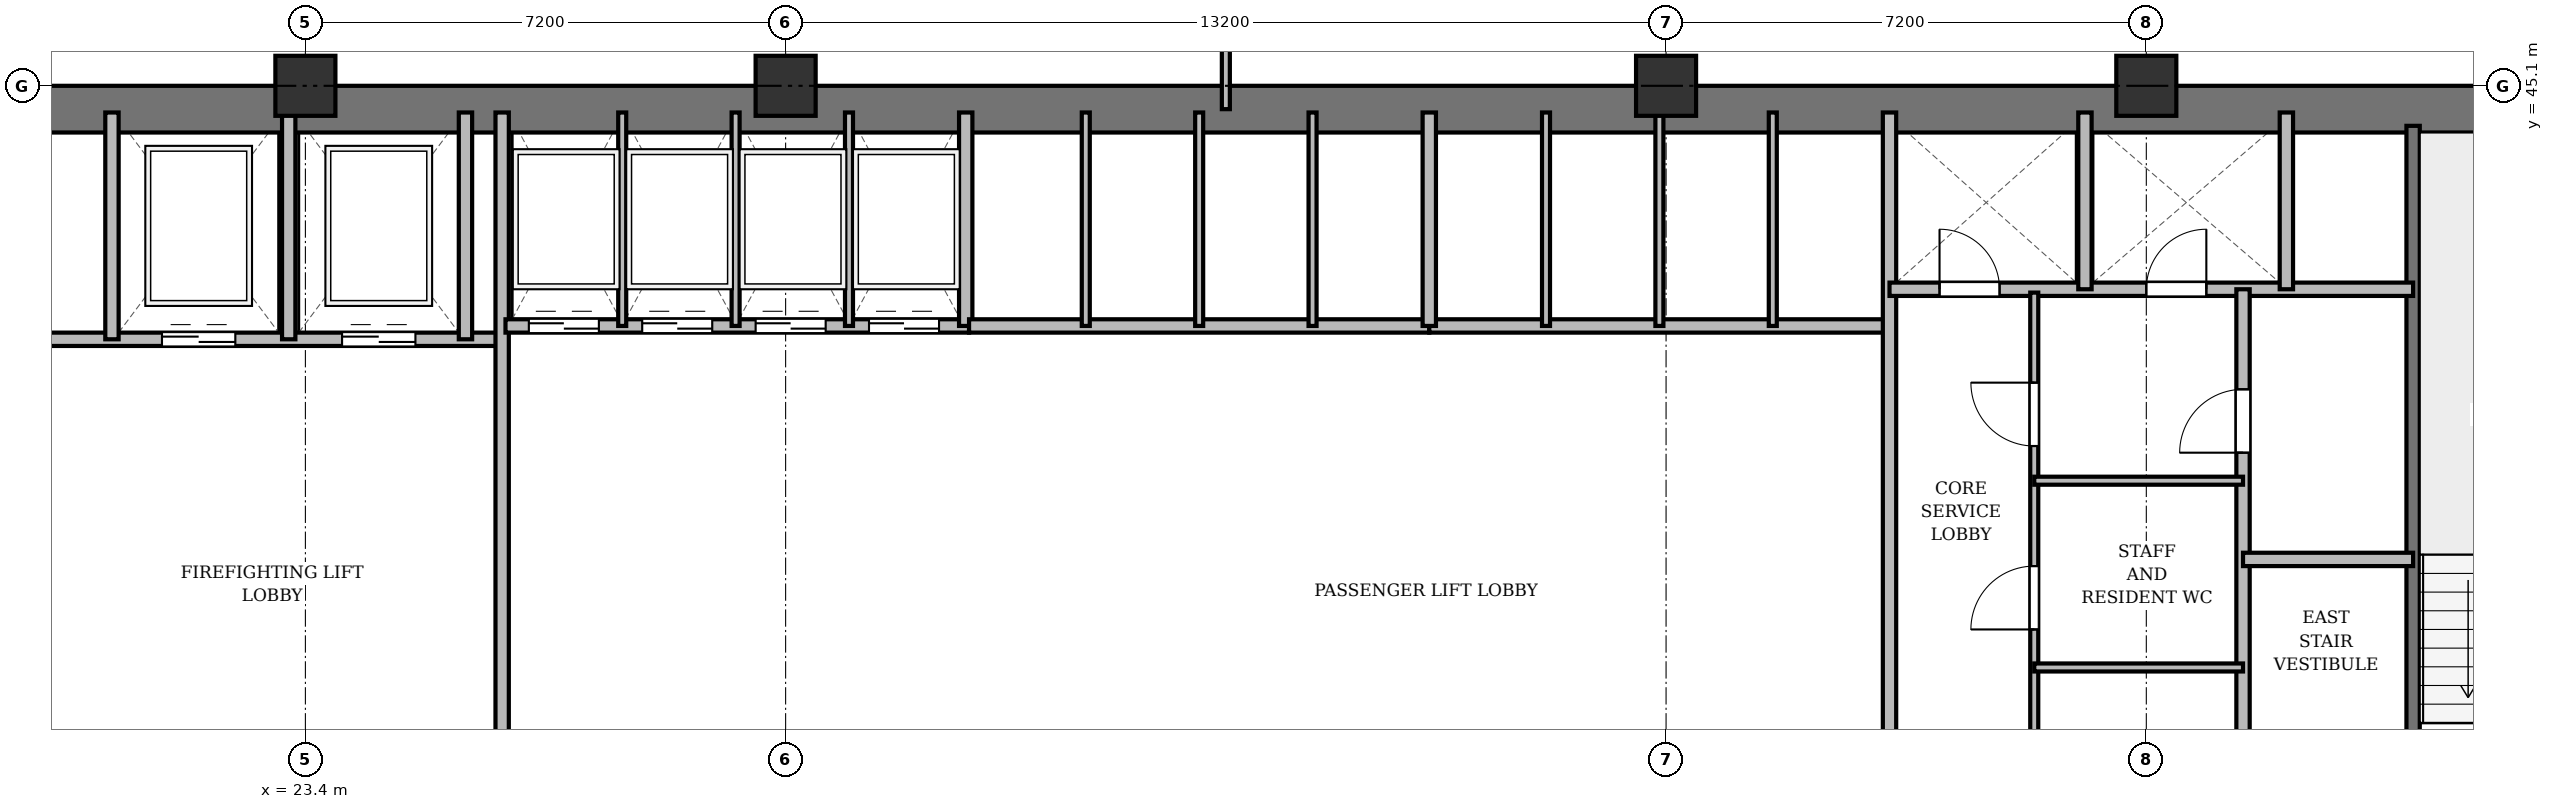
"""IFC4 building model, lengths in metres.
Left out: names, types, materials, properties, quantities, classifications, styles, units other than length and angle.
Written with IfcOpenShell. Run it as: python <this file> out.ifc"""

import sys

from ifc_helpers import new_model, si_unit, direction, frame, frame_2d, origin, origin_2d, place, context, subcontext, project, spatial, rectangle, extrude, source, transform, mapped, element, fill, save


model = new_model("IFC4")
c1 = context("Model", 3, precision=1e-05, world=origin(), true_north=direction((0.0, 1.0)))
c2 = subcontext(c1, "Body", "Model", "MODEL_VIEW")
j1 = project(units=[si_unit("LENGTHUNIT", "METRE"), si_unit("PLANEANGLEUNIT", "RADIAN")], contexts=[c1])
p1 = place(None, origin())
s1 = spatial("IfcSite", under=j1, at=p1, CompositionType="ELEMENT")
p2 = place(p1, origin())
s2 = spatial("IfcBuilding", under=s1, at=p2, CompositionType="ELEMENT")
p3 = place(p2, frame((0.0, 0.0, 34.3)))
s3 = spatial("IfcBuildingStorey", under=s2, at=p3, CompositionType="ELEMENT", Elevation=34.3)
m1 = source(origin(), c2, "Body", "SweptSolid", [
    extrude(rectangle(XDim=0.9, YDim=0.9, at=origin_2d()), origin(), (0.0, 0.0, 1.0), 3.6),
])
for number, where, z_axis, x_axis in (
    (1, (23.4, 45.1, 0.0), (0.0, 0.0, 1.0), (1.0, 0.0, 0.0)),
    (2, (30.6, 45.1, 0.0), (0.0, 0.0, 1.0), (1.0, 0.0, 0.0)),
    (3, (43.8, 45.1, 0.0), (0.0, 0.0, 1.0), (1.0, 0.0, 0.0)),
    (4, (51.0, 45.1, 0.0), (0.0, 0.0, 1.0), (1.0, 0.0, 0.0)),
):
    element("IfcColumn", number, at=place(p3, frame(where, z_axis=z_axis, x_axis=x_axis)), inside=s3, PredefinedType="COLUMN", context=c2, shape_type="MappedRepresentation", body=[
        mapped(m1, transform((0.0, 0.0, 0.0), x_axis=(1.0, 0.0, 0.0), y_axis=(0.0, 1.0, 0.0), z_axis=(0.0, 0.0, 1.0), scale=1.0)),
    ])
p4 = place(p3, frame((15.5, 44.75, 0.0), z_axis=(0.0, 0.0, 1.0), x_axis=(1.0, 0.0, 0.0)))
e5 = element("IfcWall", 5, at=p4, inside=s3, PredefinedType="SHEAR", context=c2, shape_type="SweptSolid", body=[
    extrude(rectangle(XDim=43.4, YDim=0.7, at=frame_2d((21.7, 0.0))), origin(), (0.0, 0.0, 1.0), 3.34),
])
p5 = place(p3, frame((55.0, 33.4, 0.0), z_axis=(0.0, 0.0, 1.0), x_axis=(0.0, 1.0, 0.0)))
e6 = element("IfcWall", 6, at=p5, inside=s3, PredefinedType="SHEAR", context=c2, shape_type="SweptSolid", body=[
    extrude(rectangle(XDim=11.1, YDim=0.2, at=frame_2d((5.55, 0.0))), origin(), (0.0, 0.0, 1.0), 3.34),
])
p6 = place(p5, frame((0.85, 0.0, 0.0)))
e7 = element("IfcOpeningElement", 7, at=p6, cuts=e6, PredefinedType="OPENING", context=c2, shape_type="SweptSolid", body=[
    extrude(rectangle(XDim=1.1, YDim=2.15, at=frame_2d((0.55, 1.075))), frame((0.0, 0.11, 0.0), z_axis=(0.0, -1.0, 0.0), x_axis=(1.0, 0.0, 0.0)), (0.0, 0.0, 1.0), 0.22),
])
p7 = place(p3, frame((19.55, 41.3, 0.0), z_axis=(0.0, 0.0, 1.0), x_axis=(1.0, 0.0, 0.0)))
e8 = element("IfcWall", 8, at=p7, inside=s3, PredefinedType="SOLIDWALL", context=c2, shape_type="SweptSolid", body=[
    extrude(rectangle(XDim=6.75, YDim=0.2, at=frame_2d((3.375, 0.0))), origin(), (0.0, 0.0, 1.0), 3.34),
])
p8 = place(p7, frame((1.7, 0.0, 0.0)))
e9 = element("IfcOpeningElement", 9, at=p8, cuts=e8, PredefinedType="OPENING", context=c2, shape_type="SweptSolid", body=[
    extrude(rectangle(XDim=1.1, YDim=2.15, at=frame_2d((0.55, 1.075))), frame((0.0, 0.11, 0.0), z_axis=(0.0, -1.0, 0.0), x_axis=(1.0, 0.0, 0.0)), (0.0, 0.0, 1.0), 0.22),
])
p9 = place(p7, frame((4.4, 0.0, 0.0)))
e10 = element("IfcOpeningElement", 10, at=p9, cuts=e8, PredefinedType="OPENING", context=c2, shape_type="SweptSolid", body=[
    extrude(rectangle(XDim=1.1, YDim=2.15, at=frame_2d((0.55, 1.075))), frame((0.0, 0.11, 0.0), z_axis=(0.0, -1.0, 0.0), x_axis=(1.0, 0.0, 0.0)), (0.0, 0.0, 1.0), 0.22),
])
for number, where, z_axis, x_axis in (
    (11, (20.5, 41.3, 0.0), (0.0, 0.0, 1.0), (0.0, 1.0, 0.0)),
    (12, (23.15, 41.3, 0.0), (0.0, 0.0, 1.0), (0.0, 1.0, 0.0)),
    (13, (25.8, 41.3, 0.0), (0.0, 0.0, 1.0), (0.0, 1.0, 0.0)),
):
    element("IfcWall", number, at=place(p3, frame(where, z_axis=z_axis, x_axis=x_axis)), inside=s3, PredefinedType="SOLIDWALL", context=c2, shape_type="SweptSolid", body=[
        extrude(rectangle(XDim=3.4, YDim=0.2, at=frame_2d((1.7, 0.0))), origin(), (0.0, 0.0, 1.0), 3.34),
    ])
p10 = place(p3, frame((26.35, 33.4, 0.0), z_axis=(0.0, 0.0, 1.0), x_axis=(0.0, 1.0, 0.0)))
e14 = element("IfcWall", 14, at=p10, inside=s3, PredefinedType="SOLIDWALL", context=c2, shape_type="SweptSolid", body=[
    extrude(rectangle(XDim=11.3, YDim=0.2, at=frame_2d((5.65, 0.0))), origin(), (0.0, 0.0, 1.0), 2.69),
])
p11 = place(p3, frame((26.4, 41.5, 0.0), z_axis=(0.0, 0.0, 1.0), x_axis=(1.0, 0.0, 0.0)))
e15 = element("IfcWall", 15, at=p11, inside=s3, PredefinedType="SOLIDWALL", context=c2, shape_type="SweptSolid", body=[
    extrude(rectangle(XDim=6.95, YDim=0.2, at=frame_2d((3.475, 0.0))), origin(), (0.0, 0.0, 1.0), 3.34),
])
p12 = place(p11, frame((0.35, 0.0, 0.0)))
e16 = element("IfcOpeningElement", 16, at=p12, cuts=e15, PredefinedType="OPENING", context=c2, shape_type="SweptSolid", body=[
    extrude(rectangle(XDim=1.05, YDim=2.15, at=frame_2d((0.525, 1.075))), frame((0.0, 0.11, 0.0), z_axis=(0.0, -1.0, 0.0), x_axis=(1.0, 0.0, 0.0)), (0.0, 0.0, 1.0), 0.22),
])
p13 = place(p11, frame((2.05, 0.0, 0.0)))
e17 = element("IfcOpeningElement", 17, at=p13, cuts=e15, PredefinedType="OPENING", context=c2, shape_type="SweptSolid", body=[
    extrude(rectangle(XDim=1.05, YDim=2.15, at=frame_2d((0.525, 1.075))), frame((0.0, 0.11, 0.0), z_axis=(0.0, -1.0, 0.0), x_axis=(1.0, 0.0, 0.0)), (0.0, 0.0, 1.0), 0.22),
])
p14 = place(p11, frame((3.75, 0.0, 0.0)))
e18 = element("IfcOpeningElement", 18, at=p14, cuts=e15, PredefinedType="OPENING", context=c2, shape_type="SweptSolid", body=[
    extrude(rectangle(XDim=1.05, YDim=2.15, at=frame_2d((0.525, 1.075))), frame((0.0, 0.11, 0.0), z_axis=(0.0, -1.0, 0.0), x_axis=(1.0, 0.0, 0.0)), (0.0, 0.0, 1.0), 0.22),
])
p15 = place(p11, frame((5.45, 0.0, 0.0)))
e19 = element("IfcOpeningElement", 19, at=p15, cuts=e15, PredefinedType="OPENING", context=c2, shape_type="SweptSolid", body=[
    extrude(rectangle(XDim=1.05, YDim=2.15, at=frame_2d((0.525, 1.075))), frame((0.0, 0.11, 0.0), z_axis=(0.0, -1.0, 0.0), x_axis=(1.0, 0.0, 0.0)), (0.0, 0.0, 1.0), 0.22),
])
p16 = place(p3, frame((33.3, 41.5, 0.0), z_axis=(0.0, 0.0, 1.0), x_axis=(0.0, 1.0, 0.0)))
e20 = element("IfcWall", 20, at=p16, inside=s3, PredefinedType="SOLIDWALL", context=c2, shape_type="SweptSolid", body=[
    extrude(rectangle(XDim=3.2, YDim=0.2, at=frame_2d((1.6, 0.0))), origin(), (0.0, 0.0, 1.0), 3.34),
])
for number, where, z_axis, x_axis in (
    (21, (28.15, 41.5, 0.0), (0.0, 0.0, 1.0), (0.0, 1.0, 0.0)),
    (22, (29.85, 41.5, 0.0), (0.0, 0.0, 1.0), (0.0, 1.0, 0.0)),
    (23, (31.55, 41.5, 0.0), (0.0, 0.0, 1.0), (0.0, 1.0, 0.0)),
):
    element("IfcWall", number, at=place(p3, frame(where, z_axis=z_axis, x_axis=x_axis)), inside=s3, PredefinedType="PARTITIONING", context=c2, shape_type="SweptSolid", body=[
        extrude(rectangle(XDim=3.2, YDim=0.12, at=frame_2d((1.6, 0.0))), origin(), (0.0, 0.0, 1.0), 3.34),
    ])
p17 = place(p3, frame((33.35, 41.5, 0.0), z_axis=(0.0, 0.0, 1.0), x_axis=(1.0, 0.0, 0.0)))
e24 = element("IfcWall", 24, at=p17, inside=s3, PredefinedType="SOLIDWALL", context=c2, shape_type="SweptSolid", body=[
    extrude(rectangle(XDim=6.9, YDim=0.2, at=frame_2d((3.45, 0.0))), origin(), (0.0, 0.0, 1.0), 3.34),
])
for number, where, z_axis, x_axis in (
    (25, (35.1, 41.5, 0.0), (0.0, 0.0, 1.0), (0.0, 1.0, 0.0)),
    (26, (36.8, 41.5, 0.0), (0.0, 0.0, 1.0), (0.0, 1.0, 0.0)),
    (27, (38.5, 41.5, 0.0), (0.0, 0.0, 1.0), (0.0, 1.0, 0.0)),
):
    element("IfcWall", number, at=place(p3, frame(where, z_axis=z_axis, x_axis=x_axis)), inside=s3, PredefinedType="PARTITIONING", context=c2, shape_type="SweptSolid", body=[
        extrude(rectangle(XDim=3.2, YDim=0.12, at=frame_2d((1.6, 0.0))), origin(), (0.0, 0.0, 1.0), 3.34),
    ])
p18 = place(p3, frame((40.25, 41.5, 0.0), z_axis=(0.0, 0.0, 1.0), x_axis=(1.0, 0.0, 0.0)))
e28 = element("IfcWall", 28, at=p18, inside=s3, PredefinedType="SOLIDWALL", context=c2, shape_type="SweptSolid", body=[
    extrude(rectangle(XDim=6.9, YDim=0.2, at=frame_2d((3.45, 0.0))), origin(), (0.0, 0.0, 1.0), 2.752),
])
p19 = place(p3, frame((40.25, 41.5, 0.0), z_axis=(0.0, 0.0, 1.0), x_axis=(0.0, 1.0, 0.0)))
e29 = element("IfcWall", 29, at=p19, inside=s3, PredefinedType="SOLIDWALL", context=c2, shape_type="SweptSolid", body=[
    extrude(rectangle(XDim=3.2, YDim=0.2, at=frame_2d((1.6, 0.0))), origin(), (0.0, 0.0, 1.0), 3.34),
])
p20 = place(p3, frame((42.0, 41.5, 0.0), z_axis=(0.0, 0.0, 1.0), x_axis=(0.0, 1.0, 0.0)))
e30 = element("IfcWall", 30, at=p20, inside=s3, PredefinedType="PARTITIONING", context=c2, shape_type="SweptSolid", body=[
    extrude(rectangle(XDim=3.2, YDim=0.12, at=frame_2d((1.6, 0.0))), origin(), (0.0, 0.0, 1.0), 3.34),
])
p21 = place(p3, frame((43.7, 41.5, 0.0), z_axis=(0.0, 0.0, 1.0), x_axis=(0.0, 1.0, 0.0)))
e31 = element("IfcWall", 31, at=p21, inside=s3, PredefinedType="PARTITIONING", context=c2, shape_type="SweptSolid", body=[
    extrude(rectangle(XDim=3.2, YDim=0.12, at=frame_2d((1.6, 0.0))), origin(), (0.0, 0.0, 1.0), 2.752),
])
p22 = place(p3, frame((45.4, 41.5, 0.0), z_axis=(0.0, 0.0, 1.0), x_axis=(0.0, 1.0, 0.0)))
e32 = element("IfcWall", 32, at=p22, inside=s3, PredefinedType="PARTITIONING", context=c2, shape_type="SweptSolid", body=[
    extrude(rectangle(XDim=3.2, YDim=0.12, at=frame_2d((1.6, 0.0))), origin(), (0.0, 0.0, 1.0), 3.34),
])
p23 = place(p3, frame((47.15, 33.4, 0.0), z_axis=(0.0, 0.0, 1.0), x_axis=(0.0, 1.0, 0.0)))
e33 = element("IfcWall", 33, at=p23, inside=s3, PredefinedType="SOLIDWALL", context=c2, shape_type="SweptSolid", body=[
    extrude(rectangle(XDim=11.3, YDim=0.2, at=frame_2d((5.65, 0.0))), origin(), (0.0, 0.0, 1.0), 2.69),
])
p24 = place(p3, frame((47.15, 42.05, 0.0), z_axis=(0.0, 0.0, 1.0), x_axis=(1.0, 0.0, 0.0)))
e34 = element("IfcWall", 34, at=p24, inside=s3, PredefinedType="SOLIDWALL", context=c2, shape_type="SweptSolid", body=[
    extrude(rectangle(XDim=7.85, YDim=0.2, at=frame_2d((3.925, 0.0))), origin(), (0.0, 0.0, 1.0), 2.752),
])
p25 = place(p24, frame((0.75, 0.0, 0.0)))
e35 = element("IfcOpeningElement", 35, at=p25, cuts=e34, PredefinedType="OPENING", context=c2, shape_type="SweptSolid", body=[
    extrude(rectangle(XDim=0.9, YDim=2.1, at=frame_2d((0.45, 1.05))), frame((0.0, 0.11, 0.0), z_axis=(0.0, -1.0, 0.0), x_axis=(1.0, 0.0, 0.0)), (0.0, 0.0, 1.0), 0.22),
])
p26 = place(p24, frame((3.85, 0.0, 0.0)))
e36 = element("IfcOpeningElement", 36, at=p26, cuts=e34, PredefinedType="OPENING", context=c2, shape_type="SweptSolid", body=[
    extrude(rectangle(XDim=0.9, YDim=2.1, at=frame_2d((0.45, 1.05))), frame((0.0, 0.11, 0.0), z_axis=(0.0, -1.0, 0.0), x_axis=(1.0, 0.0, 0.0)), (0.0, 0.0, 1.0), 0.22),
])
for number, where, z_axis, x_axis in (
    (37, (50.08, 42.05, 0.0), (0.0, 0.0, 1.0), (0.0, 1.0, 0.0)),
    (38, (53.1, 42.05, 0.0), (0.0, 0.0, 1.0), (0.0, 1.0, 0.0)),
):
    element("IfcWall", number, at=place(p3, frame(where, z_axis=z_axis, x_axis=x_axis)), inside=s3, PredefinedType="SOLIDWALL", context=c2, shape_type="SweptSolid", body=[
        extrude(rectangle(XDim=2.65, YDim=0.2, at=frame_2d((1.325, 0.0))), origin(), (0.0, 0.0, 1.0), 3.34),
    ])
p27 = place(p3, frame((52.45, 33.4, 0.0), z_axis=(0.0, 0.0, 1.0), x_axis=(0.0, 1.0, 0.0)))
e39 = element("IfcWall", 39, at=p27, inside=s3, PredefinedType="PARTITIONING", context=c2, shape_type="SweptSolid", body=[
    extrude(rectangle(XDim=8.65, YDim=0.2, at=frame_2d((4.325, 0.0))), origin(), (0.0, 0.0, 1.0), 2.69),
])
p28 = place(p27, frame((6.2, 0.0, 0.0)))
e40 = element("IfcOpeningElement", 40, at=p28, cuts=e39, PredefinedType="OPENING", context=c2, shape_type="SweptSolid", body=[
    extrude(rectangle(XDim=0.95, YDim=2.15, at=frame_2d((0.475, 1.075))), frame((0.0, 0.11, 0.0), z_axis=(0.0, -1.0, 0.0), x_axis=(1.0, 0.0, 0.0)), (0.0, 0.0, 1.0), 0.22),
])
p29 = place(p3, frame((52.45, 38.0, 0.0), z_axis=(0.0, 0.0, 1.0), x_axis=(1.0, 0.0, 0.0)))
e41 = element("IfcWall", 41, at=p29, inside=s3, PredefinedType="PARTITIONING", context=c2, shape_type="SweptSolid", body=[
    extrude(rectangle(XDim=2.55, YDim=0.2, at=frame_2d((1.275, 0.0))), origin(), (0.0, 0.0, 1.0), 3.34),
])
p30 = place(p3, frame((49.32, 33.4, 0.0), z_axis=(0.0, 0.0, 1.0), x_axis=(0.0, 1.0, 0.0)))
e42 = element("IfcWall", 42, at=p30, inside=s3, PredefinedType="PARTITIONING", context=c2, shape_type="SweptSolid", body=[
    extrude(rectangle(XDim=8.6, YDim=0.12, at=frame_2d((4.3, 0.0))), origin(), (0.0, 0.0, 1.0), 2.69),
])
p31 = place(p30, frame((0.85, 0.0, 0.0)))
e43 = element("IfcOpeningElement", 43, at=p31, cuts=e42, PredefinedType="OPENING", context=c2, shape_type="SweptSolid", body=[
    extrude(rectangle(XDim=0.95, YDim=2.15, at=frame_2d((0.475, 1.075))), frame((0.0, 0.07, 0.0), z_axis=(0.0, -1.0, 0.0), x_axis=(1.0, 0.0, 0.0)), (0.0, 0.0, 1.0), 0.14),
])
p32 = place(p30, frame((3.55, 0.0, 0.0)))
e44 = element("IfcOpeningElement", 44, at=p32, cuts=e42, PredefinedType="OPENING", context=c2, shape_type="SweptSolid", body=[
    extrude(rectangle(XDim=0.95, YDim=2.15, at=frame_2d((0.475, 1.075))), frame((0.0, 0.07, 0.0), z_axis=(0.0, -1.0, 0.0), x_axis=(1.0, 0.0, 0.0)), (0.0, 0.0, 1.0), 0.14),
])
p33 = place(p30, frame((6.3, 0.0, 0.0)))
e45 = element("IfcOpeningElement", 45, at=p33, cuts=e42, PredefinedType="OPENING", context=c2, shape_type="SweptSolid", body=[
    extrude(rectangle(XDim=0.95, YDim=2.15, at=frame_2d((0.475, 1.075))), frame((0.0, 0.07, 0.0), z_axis=(0.0, -1.0, 0.0), x_axis=(1.0, 0.0, 0.0)), (0.0, 0.0, 1.0), 0.14),
])
for number, where, z_axis, x_axis in (
    (46, (49.32, 36.38, 0.0), (0.0, 0.0, 1.0), (1.0, 0.0, 0.0)),
    (47, (49.32, 39.18, 0.0), (0.0, 0.0, 1.0), (1.0, 0.0, 0.0)),
):
    element("IfcWall", number, at=place(p3, frame(where, z_axis=z_axis, x_axis=x_axis)), inside=s3, PredefinedType="PARTITIONING", context=c2, shape_type="SweptSolid", body=[
        extrude(rectangle(XDim=3.13, YDim=0.12, at=frame_2d((1.565, 0.0))), origin(), (0.0, 0.0, 1.0), 2.752),
    ])
p34 = place(p3, frame((37.2, 44.75, 0.0), z_axis=(0.0, 0.0, 1.0), x_axis=(0.0, 1.0, 0.0)))
e48 = element("IfcWall", 48, at=p34, inside=s3, PredefinedType="PARTITIONING", context=c2, shape_type="SweptSolid", body=[
    extrude(rectangle(XDim=3.61, YDim=0.12, at=frame_2d((1.805, 0.0))), origin(), (0.0, 0.0, 1.0), 2.69),
])
p35 = place(p34, frame((1.1, 0.0, 0.0)))
e49 = element("IfcOpeningElement", 49, at=p35, cuts=e48, PredefinedType="OPENING", context=c2, shape_type="SweptSolid", body=[
    extrude(rectangle(XDim=0.95, YDim=2.15, at=frame_2d((0.475, 1.075))), frame((0.0, 0.07, 0.0), z_axis=(0.0, -1.0, 0.0), x_axis=(1.0, 0.0, 0.0)), (0.0, 0.0, 1.0), 0.14),
])
m2 = source(origin(), c2, "Body", "SweptSolid", [
    extrude(rectangle(XDim=1.1, YDim=2.15, at=frame_2d((0.55, 1.075))), frame((0.0, 0.025, 0.0), z_axis=(0.0, -1.0, 0.0), x_axis=(1.0, 0.0, 0.0)), (0.0, 0.0, 1.0), 0.05),
])
p36 = place(p8, origin())
e50 = element("IfcDoor", 50, at=p36, inside=s3, OperationType="DOUBLE_DOOR_SLIDING", PredefinedType="DOOR", context=c2, shape_type="MappedRepresentation", body=[
    mapped(m2, transform((0.0, 0.0, 0.0), x_axis=(1.0, 0.0, 0.0), y_axis=(0.0, 1.0, 0.0), z_axis=(0.0, 0.0, 1.0), scale=1.0)),
])
fill(e9, e50)
p37 = place(p9, origin())
e51 = element("IfcDoor", 51, at=p37, inside=s3, OperationType="DOUBLE_DOOR_SLIDING", PredefinedType="DOOR", context=c2, shape_type="MappedRepresentation", body=[
    mapped(m2, transform((0.0, 0.0, 0.0), x_axis=(1.0, 0.0, 0.0), y_axis=(0.0, 1.0, 0.0), z_axis=(0.0, 0.0, 1.0), scale=1.0)),
])
fill(e10, e51)
m3 = source(origin(), c2, "Body", "SweptSolid", [
    extrude(rectangle(XDim=1.05, YDim=2.15, at=frame_2d((0.525, 1.075))), frame((0.0, 0.025, 0.0), z_axis=(0.0, -1.0, 0.0), x_axis=(1.0, 0.0, 0.0)), (0.0, 0.0, 1.0), 0.05),
])
p38 = place(p12, origin())
e52 = element("IfcDoor", 52, at=p38, inside=s3, OperationType="DOUBLE_DOOR_SLIDING", PredefinedType="DOOR", context=c2, shape_type="MappedRepresentation", body=[
    mapped(m3, transform((0.0, 0.0, 0.0), x_axis=(1.0, 0.0, 0.0), y_axis=(0.0, 1.0, 0.0), z_axis=(0.0, 0.0, 1.0), scale=1.0)),
])
fill(e16, e52)
p39 = place(p13, origin())
e53 = element("IfcDoor", 53, at=p39, inside=s3, OperationType="DOUBLE_DOOR_SLIDING", PredefinedType="DOOR", context=c2, shape_type="MappedRepresentation", body=[
    mapped(m3, transform((0.0, 0.0, 0.0), x_axis=(1.0, 0.0, 0.0), y_axis=(0.0, 1.0, 0.0), z_axis=(0.0, 0.0, 1.0), scale=1.0)),
])
fill(e17, e53)
p40 = place(p14, origin())
e54 = element("IfcDoor", 54, at=p40, inside=s3, OperationType="DOUBLE_DOOR_SLIDING", PredefinedType="DOOR", context=c2, shape_type="MappedRepresentation", body=[
    mapped(m3, transform((0.0, 0.0, 0.0), x_axis=(1.0, 0.0, 0.0), y_axis=(0.0, 1.0, 0.0), z_axis=(0.0, 0.0, 1.0), scale=1.0)),
])
fill(e18, e54)
p41 = place(p15, origin())
e55 = element("IfcDoor", 55, at=p41, inside=s3, OperationType="DOUBLE_DOOR_SLIDING", PredefinedType="DOOR", context=c2, shape_type="MappedRepresentation", body=[
    mapped(m3, transform((0.0, 0.0, 0.0), x_axis=(1.0, 0.0, 0.0), y_axis=(0.0, 1.0, 0.0), z_axis=(0.0, 0.0, 1.0), scale=1.0)),
])
fill(e19, e55)
m4 = source(origin(), c2, "Body", "SweptSolid", [
    extrude(rectangle(XDim=0.9, YDim=2.1, at=frame_2d((0.45, 1.05))), frame((0.0, 0.025, 0.0), z_axis=(0.0, -1.0, 0.0), x_axis=(1.0, 0.0, 0.0)), (0.0, 0.0, 1.0), 0.05),
])
p42 = place(p25, origin())
e56 = element("IfcDoor", 56, at=p42, inside=s3, OperationType="SINGLE_SWING_LEFT", PredefinedType="DOOR", context=c2, shape_type="MappedRepresentation", body=[
    mapped(m4, transform((0.0, 0.0, 0.0), x_axis=(1.0, 0.0, 0.0), y_axis=(0.0, 1.0, 0.0), z_axis=(0.0, 0.0, 1.0), scale=1.0)),
])
fill(e35, e56)
p43 = place(p26, origin())
e57 = element("IfcDoor", 57, at=p43, inside=s3, OperationType="SINGLE_SWING_RIGHT", PredefinedType="DOOR", context=c2, shape_type="MappedRepresentation", body=[
    mapped(m4, transform((0.0, 0.0, 0.0), x_axis=(1.0, 0.0, 0.0), y_axis=(0.0, 1.0, 0.0), z_axis=(0.0, 0.0, 1.0), scale=1.0)),
])
fill(e36, e57)
m5 = source(origin(), c2, "Body", "SweptSolid", [
    extrude(rectangle(XDim=0.95, YDim=2.15, at=frame_2d((0.475, 1.075))), frame((0.0, 0.025, 0.0), z_axis=(0.0, -1.0, 0.0), x_axis=(1.0, 0.0, 0.0)), (0.0, 0.0, 1.0), 0.05),
])
p44 = place(p28, origin())
e58 = element("IfcDoor", 58, at=p44, inside=s3, OperationType="SINGLE_SWING_LEFT", PredefinedType="DOOR", context=c2, shape_type="MappedRepresentation", body=[
    mapped(m5, transform((0.0, 0.0, 0.0), x_axis=(1.0, 0.0, 0.0), y_axis=(0.0, 1.0, 0.0), z_axis=(0.0, 0.0, 1.0), scale=1.0)),
])
fill(e40, e58)
p45 = place(p32, origin())
e59 = element("IfcDoor", 59, at=p45, inside=s3, OperationType="SINGLE_SWING_LEFT", PredefinedType="DOOR", context=c2, shape_type="MappedRepresentation", body=[
    mapped(m5, transform((0.0, 0.0, 0.0), x_axis=(1.0, 0.0, 0.0), y_axis=(0.0, 1.0, 0.0), z_axis=(0.0, 0.0, 1.0), scale=1.0)),
])
fill(e44, e59)
p46 = place(p33, origin())
e60 = element("IfcDoor", 60, at=p46, inside=s3, OperationType="SINGLE_SWING_RIGHT", PredefinedType="DOOR", context=c2, shape_type="MappedRepresentation", body=[
    mapped(m5, transform((0.0, 0.0, 0.0), x_axis=(1.0, 0.0, 0.0), y_axis=(0.0, 1.0, 0.0), z_axis=(0.0, 0.0, 1.0), scale=1.0)),
])
fill(e45, e60)
save(model, sys.argv[1])
